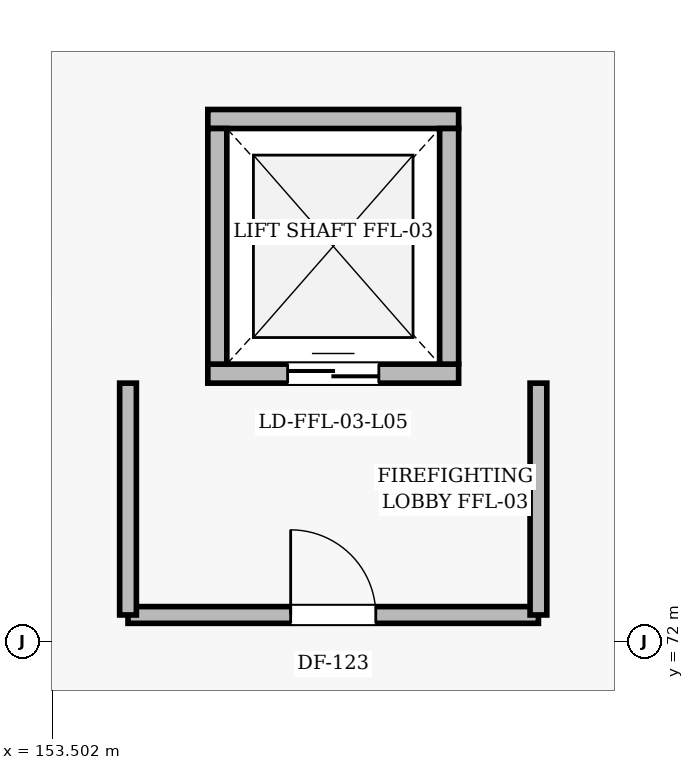
"""IFC4 building model, lengths in metres.
Left out: names, types, materials, properties, quantities, classifications, styles, units other than length and angle.
Written with IfcOpenShell. Run it as: python <this file> out.ifc"""

import sys

from ifc_helpers import new_model, si_unit, direction, frame, frame_2d, origin, place, context, subcontext, project, spatial, rectangle, extrude, element, fill, save


model = new_model("IFC4")
c1 = context("Model", 3, precision=1e-05, world=origin(), true_north=direction((0.0, 1.0)))
c2 = subcontext(c1, "Body", "Model", "MODEL_VIEW")
j1 = project(units=[si_unit("LENGTHUNIT", "METRE"), si_unit("PLANEANGLEUNIT", "RADIAN")], contexts=[c1])
p1 = place(None, origin())
s1 = spatial("IfcSite", under=j1, at=p1, CompositionType="ELEMENT")
p2 = place(p1, origin())
s2 = spatial("IfcBuilding", under=s1, at=p2, CompositionType="ELEMENT")
p3 = place(p2, frame((0.0, 0.0, 25.2)))
s3 = spatial("IfcBuildingStorey", under=s2, at=p3, CompositionType="ELEMENT", Elevation=25.2)
p4 = place(p3, frame((155.55, 75.525, 0.0), z_axis=(0.0, 0.0, 1.0), x_axis=(1.0, 0.0, 0.0)))
e1 = element("IfcWall", 1, at=p4, inside=s3, PredefinedType="SOLIDWALL", context=c2, shape_type="SweptSolid", body=[
    extrude(rectangle(XDim=3.3, YDim=0.25, at=frame_2d((1.65, 0.0))), origin(), (0.0, 0.0, 1.0), 4.6),
])
p5 = place(p4, frame((1.05, 0.0, 0.0)))
e2 = element("IfcOpeningElement", 2, at=p5, cuts=e1, PredefinedType="OPENING", context=c2, shape_type="SweptSolid", body=[
    extrude(rectangle(XDim=1.2, YDim=2.25, at=frame_2d((0.6, 1.125))), frame((0.0, 0.135, 0.0), z_axis=(0.0, -1.0, 0.0), x_axis=(1.0, 0.0, 0.0)), (0.0, 0.0, 1.0), 0.27),
])
p6 = place(p3, frame((158.85, 78.875, 0.0), z_axis=(0.0, 0.0, 1.0), x_axis=(-1.0, 0.0, 0.0)))
e3 = element("IfcWall", 3, at=p6, inside=s3, PredefinedType="SOLIDWALL", context=c2, shape_type="SweptSolid", body=[
    extrude(rectangle(XDim=3.3, YDim=0.25, at=frame_2d((1.65, 0.0))), origin(), (0.0, 0.0, 1.0), 4.6),
])
for number, where, z_axis, x_axis in (
    (4, (155.675, 78.75, 0.0), (0.0, 0.0, 1.0), (0.0, -1.0, 0.0)),
    (5, (158.725, 75.65, 0.0), (0.0, 0.0, 1.0), (0.0, 1.0, 0.0)),
):
    element("IfcWall", number, at=place(p3, frame(where, z_axis=z_axis, x_axis=x_axis)), inside=s3, PredefinedType="SOLIDWALL", context=c2, shape_type="SweptSolid", body=[
        extrude(rectangle(XDim=3.1, YDim=0.25, at=frame_2d((1.55, 0.0))), origin(), (0.0, 0.0, 1.0), 4.272),
    ])
p7 = place(p3, frame((154.5, 72.35, 0.0), z_axis=(0.0, 0.0, 1.0), x_axis=(1.0, 0.0, 0.0)))
e6 = element("IfcWall", 6, at=p7, inside=s3, PredefinedType="SOLIDWALL", context=c2, shape_type="SweptSolid", body=[
    extrude(rectangle(XDim=5.4, YDim=0.22, at=frame_2d((2.7, 0.0))), origin(), (0.0, 0.0, 1.0), 3.807),
])
p8 = place(p7, frame((2.14, 0.0, 0.0)))
e7 = element("IfcOpeningElement", 7, at=p8, cuts=e6, PredefinedType="OPENING", context=c2, shape_type="SweptSolid", body=[
    extrude(rectangle(XDim=1.12, YDim=2.2, at=frame_2d((0.56, 1.1))), frame((0.0, 0.12, 0.0), z_axis=(0.0, -1.0, 0.0), x_axis=(1.0, 0.0, 0.0)), (0.0, 0.0, 1.0), 0.24),
])
for number, where, z_axis, x_axis in (
    (8, (154.5, 72.35, 0.0), (0.0, 0.0, 1.0), (0.0, 1.0, 0.0)),
    (9, (159.9, 72.35, 0.0), (0.0, 0.0, 1.0), (0.0, 1.0, 0.0)),
):
    element("IfcWall", number, at=place(p3, frame(where, z_axis=z_axis, x_axis=x_axis)), inside=s3, PredefinedType="SOLIDWALL", context=c2, shape_type="SweptSolid", body=[
        extrude(rectangle(XDim=3.05, YDim=0.22, at=frame_2d((1.525, 0.0))), origin(), (0.0, 0.0, 1.0), 3.807),
    ])
p9 = place(p5, origin())
e10 = element("IfcDoor", 10, at=p9, inside=s3, OperationType="DOUBLE_DOOR_SLIDING", PredefinedType="DOOR", context=c2, shape_type="SweptSolid", body=[
    extrude(rectangle(XDim=1.2, YDim=2.25, at=frame_2d((0.6, 1.125))), frame((0.0, 0.025, 0.0), z_axis=(0.0, -1.0, 0.0), x_axis=(1.0, 0.0, 0.0)), (0.0, 0.0, 1.0), 0.05),
])
fill(e2, e10)
p10 = place(p8, origin())
e11 = element("IfcDoor", 11, at=p10, inside=s3, OperationType="SINGLE_SWING_LEFT", PredefinedType="DOOR", context=c2, shape_type="SweptSolid", body=[
    extrude(rectangle(XDim=1.12, YDim=2.2, at=frame_2d((0.56, 1.1))), frame((0.0, 0.025, 0.0), z_axis=(0.0, -1.0, 0.0), x_axis=(1.0, 0.0, 0.0)), (0.0, 0.0, 1.0), 0.05),
])
fill(e7, e11)
save(model, sys.argv[1])
